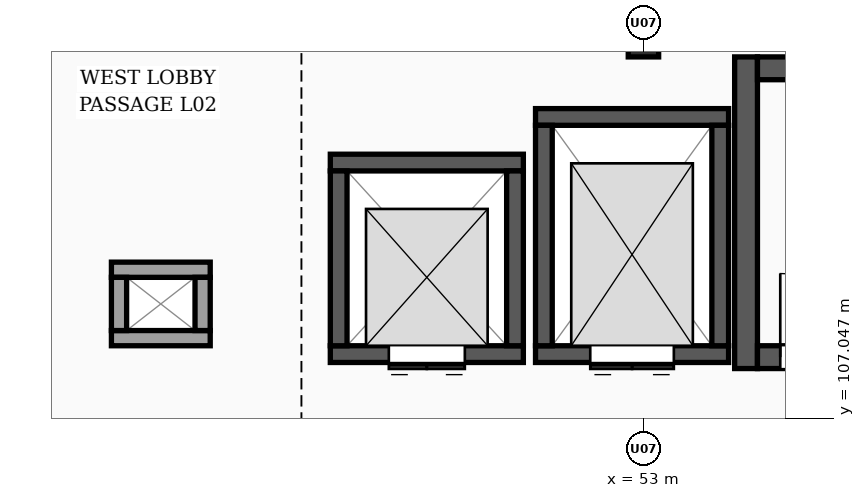
"""IFC4 building model, lengths in metres.
Left out: names, types, materials, properties, quantities, classifications, styles, units other than length and angle.
Written with IfcOpenShell. Run it as: python <this file> out.ifc"""

import sys

from ifc_helpers import new_model, si_unit, direction, frame, frame_2d, origin, origin_2d, place, context, subcontext, project, spatial, rectangle, extrude, element, fill, save


model = new_model("IFC4")
c1 = context("Model", 3, precision=1e-05, world=origin(), true_north=direction((0.0, 1.0)))
c2 = subcontext(c1, "Body", "Model", "MODEL_VIEW")
j1 = project(units=[si_unit("LENGTHUNIT", "METRE"), si_unit("PLANEANGLEUNIT", "RADIAN")], contexts=[c1])
p1 = place(None, origin())
s1 = spatial("IfcSite", under=j1, at=p1, CompositionType="ELEMENT")
p2 = place(p1, origin())
s2 = spatial("IfcBuilding", under=s1, at=p2, CompositionType="ELEMENT")
p3 = place(p2, frame((0.0, 0.0, 8.4)))
s3 = spatial("IfcBuildingStorey", under=s2, at=p3, CompositionType="ELEMENT", Elevation=8.4)
p4 = place(p3, frame((53.0, 112.0, 0.0), z_axis=(0.0, 0.0, 1.0), x_axis=(1.0, 0.0, 0.0)))
e1 = element("IfcColumn", 1, at=p4, inside=s3, PredefinedType="COLUMN", context=c2, shape_type="SweptSolid", body=[
    extrude(rectangle(XDim=0.4, YDim=0.4, at=origin_2d()), origin(), (0.0, 0.0, 1.0), 3.9),
])
p5 = place(p3, frame((54.35, 107.7, 0.0), z_axis=(0.0, 0.0, 1.0), x_axis=(0.0, 1.0, 0.0)))
e2 = element("IfcWall", 2, at=p5, inside=s3, PredefinedType="SHEAR", context=c2, shape_type="SweptSolid", body=[
    extrude(rectangle(XDim=4.1, YDim=0.3, at=frame_2d((2.05, 0.0))), origin(), (0.0, 0.0, 1.0), 3.65),
])
p6 = place(p3, frame((54.5, 107.85, 0.0), z_axis=(0.0, 0.0, 1.0), x_axis=(1.0, 0.0, 0.0)))
e3 = element("IfcWall", 3, at=p6, inside=s3, PredefinedType="SHEAR", context=c2, shape_type="SweptSolid", body=[
    extrude(rectangle(XDim=6.8, YDim=0.3, at=frame_2d((3.4, 0.0))), origin(), (0.0, 0.0, 1.0), 3.65),
])
p7 = place(p6, frame((0.3, 0.0, 0.0)))
e4 = element("IfcOpeningElement", 4, at=p7, cuts=e3, PredefinedType="OPENING", context=c2, shape_type="SweptSolid", body=[
    extrude(rectangle(XDim=1.1, YDim=2.15, at=frame_2d((0.55, 1.075))), frame((0.0, 0.16, 0.0), z_axis=(0.0, -1.0, 0.0), x_axis=(1.0, 0.0, 0.0)), (0.0, 0.0, 1.0), 0.32),
])
p8 = place(p3, frame((61.3, 111.65, 0.0), z_axis=(0.0, 0.0, 1.0), x_axis=(-1.0, 0.0, 0.0)))
e5 = element("IfcWall", 5, at=p8, inside=s3, PredefinedType="SHEAR", context=c2, shape_type="SweptSolid", body=[
    extrude(rectangle(XDim=6.8, YDim=0.3, at=frame_2d((3.4, 0.0))), origin(), (0.0, 0.0, 1.0), 3.65),
])
p9 = place(p3, frame((54.12, 107.89, 0.0), z_axis=(0.0, 0.0, 1.0), x_axis=(-1.0, 0.0, 0.0)))
e6 = element("IfcWall", 6, at=p9, inside=s3, PredefinedType="SHEAR", context=c2, shape_type="SweptSolid", body=[
    extrude(rectangle(XDim=2.54, YDim=0.22, at=frame_2d((1.27, 0.0))), origin(), (0.0, 0.0, 1.0), 3.65),
])
p10 = place(p9, frame((0.72, 0.0, 0.0)))
e7 = element("IfcOpeningElement", 7, at=p10, cuts=e6, PredefinedType="OPENING", context=c2, shape_type="SweptSolid", body=[
    extrude(rectangle(XDim=1.1, YDim=2.15, at=frame_2d((0.55, 1.075))), frame((0.0, 0.12, 0.0), z_axis=(0.0, -1.0, 0.0), x_axis=(1.0, 0.0, 0.0)), (0.0, 0.0, 1.0), 0.24),
])
p11 = place(p3, frame((51.58, 111.01, 0.0), z_axis=(0.0, 0.0, 1.0), x_axis=(1.0, 0.0, 0.0)))
e8 = element("IfcWall", 8, at=p11, inside=s3, PredefinedType="SHEAR", context=c2, shape_type="SweptSolid", body=[
    extrude(rectangle(XDim=2.54, YDim=0.22, at=frame_2d((1.27, 0.0))), origin(), (0.0, 0.0, 1.0), 3.65),
])
for number, where, z_axis, x_axis in (
    (9, (51.69, 108.0, 0.0), (0.0, 0.0, 1.0), (0.0, 1.0, 0.0)),
    (10, (54.01, 110.9, 0.0), (0.0, 0.0, 1.0), (0.0, -1.0, 0.0)),
):
    element("IfcWall", number, at=place(p3, frame(where, z_axis=z_axis, x_axis=x_axis)), inside=s3, PredefinedType="SHEAR", context=c2, shape_type="SweptSolid", body=[
        extrude(rectangle(XDim=2.9, YDim=0.22, at=frame_2d((1.45, 0.0))), origin(), (0.0, 0.0, 1.0), 3.65),
    ])
p12 = place(p3, frame((51.42, 107.89, 0.0), z_axis=(0.0, 0.0, 1.0), x_axis=(-1.0, 0.0, 0.0)))
e11 = element("IfcWall", 11, at=p12, inside=s3, PredefinedType="SHEAR", context=c2, shape_type="SweptSolid", body=[
    extrude(rectangle(XDim=2.54, YDim=0.22, at=frame_2d((1.27, 0.0))), origin(), (0.0, 0.0, 1.0), 3.65),
])
p13 = place(p12, frame((0.77, 0.0, 0.0)))
e12 = element("IfcOpeningElement", 12, at=p13, cuts=e11, PredefinedType="OPENING", context=c2, shape_type="SweptSolid", body=[
    extrude(rectangle(XDim=1.0, YDim=2.15, at=frame_2d((0.5, 1.075))), frame((0.0, 0.12, 0.0), z_axis=(0.0, -1.0, 0.0), x_axis=(1.0, 0.0, 0.0)), (0.0, 0.0, 1.0), 0.24),
])
p14 = place(p3, frame((48.88, 110.41, 0.0), z_axis=(0.0, 0.0, 1.0), x_axis=(1.0, 0.0, 0.0)))
e13 = element("IfcWall", 13, at=p14, inside=s3, PredefinedType="SHEAR", context=c2, shape_type="SweptSolid", body=[
    extrude(rectangle(XDim=2.54, YDim=0.22, at=frame_2d((1.27, 0.0))), origin(), (0.0, 0.0, 1.0), 3.65),
])
for number, where, z_axis, x_axis in (
    (14, (48.99, 108.0, 0.0), (0.0, 0.0, 1.0), (0.0, 1.0, 0.0)),
    (15, (51.31, 110.3, 0.0), (0.0, 0.0, 1.0), (0.0, -1.0, 0.0)),
):
    element("IfcWall", number, at=place(p3, frame(where, z_axis=z_axis, x_axis=x_axis)), inside=s3, PredefinedType="SHEAR", context=c2, shape_type="SweptSolid", body=[
        extrude(rectangle(XDim=2.3, YDim=0.22, at=frame_2d((1.15, 0.0))), origin(), (0.0, 0.0, 1.0), 3.65),
    ])
for number, where, z_axis, x_axis in (
    (16, (47.3, 108.1, 0.0), (0.0, 0.0, 1.0), (-1.0, 0.0, 0.0)),
    (17, (46.0, 109.0, 0.0), (0.0, 0.0, 1.0), (1.0, 0.0, 0.0)),
):
    element("IfcWall", number, at=place(p3, frame(where, z_axis=z_axis, x_axis=x_axis)), inside=s3, PredefinedType="PARTITIONING", context=c2, shape_type="SweptSolid", body=[
        extrude(rectangle(XDim=1.3, YDim=0.2, at=frame_2d((0.65, 0.0))), origin(), (0.0, 0.0, 1.0), 3.65),
    ])
p15 = place(p3, frame((46.1, 108.2, 0.0), z_axis=(0.0, 0.0, 1.0), x_axis=(0.0, 1.0, 0.0)))
e18 = element("IfcWall", 18, at=p15, inside=s3, PredefinedType="PARTITIONING", context=c2, shape_type="SweptSolid", body=[
    extrude(rectangle(XDim=0.7, YDim=0.2, at=frame_2d((0.35, 0.0))), origin(), (0.0, 0.0, 1.0), 3.65),
])
p16 = place(p3, frame((47.2, 108.9, 0.0), z_axis=(0.0, 0.0, 1.0), x_axis=(0.0, -1.0, 0.0)))
e19 = element("IfcWall", 19, at=p16, inside=s3, PredefinedType="PARTITIONING", context=c2, shape_type="SweptSolid", body=[
    extrude(rectangle(XDim=0.7, YDim=0.2, at=frame_2d((0.35, 0.0))), origin(), (0.0, 0.0, 1.0), 3.248),
])
p17 = place(p7, origin())
e20 = element("IfcDoor", 20, at=p17, inside=s3, OperationType="SINGLE_SWING_LEFT", PredefinedType="DOOR", context=c2, shape_type="SweptSolid", body=[
    extrude(rectangle(XDim=1.1, YDim=2.15, at=frame_2d((0.55, 1.075))), frame((0.0, 0.025, 0.0), z_axis=(0.0, -1.0, 0.0), x_axis=(1.0, 0.0, 0.0)), (0.0, 0.0, 1.0), 0.05),
])
fill(e4, e20)
p18 = place(p10, origin())
e21 = element("IfcDoor", 21, at=p18, inside=s3, OperationType="DOUBLE_DOOR_SLIDING", PredefinedType="DOOR", context=c2, shape_type="SweptSolid", body=[
    extrude(rectangle(XDim=1.1, YDim=2.15, at=frame_2d((0.55, 1.075))), frame((0.0, 0.025, 0.0), z_axis=(0.0, -1.0, 0.0), x_axis=(1.0, 0.0, 0.0)), (0.0, 0.0, 1.0), 0.05),
])
fill(e7, e21)
p19 = place(p13, origin())
e22 = element("IfcDoor", 22, at=p19, inside=s3, OperationType="DOUBLE_DOOR_SLIDING", PredefinedType="DOOR", context=c2, shape_type="SweptSolid", body=[
    extrude(rectangle(XDim=1.0, YDim=2.15, at=frame_2d((0.5, 1.075))), frame((0.0, 0.025, 0.0), z_axis=(0.0, -1.0, 0.0), x_axis=(1.0, 0.0, 0.0)), (0.0, 0.0, 1.0), 0.05),
])
fill(e12, e22)
save(model, sys.argv[1])
